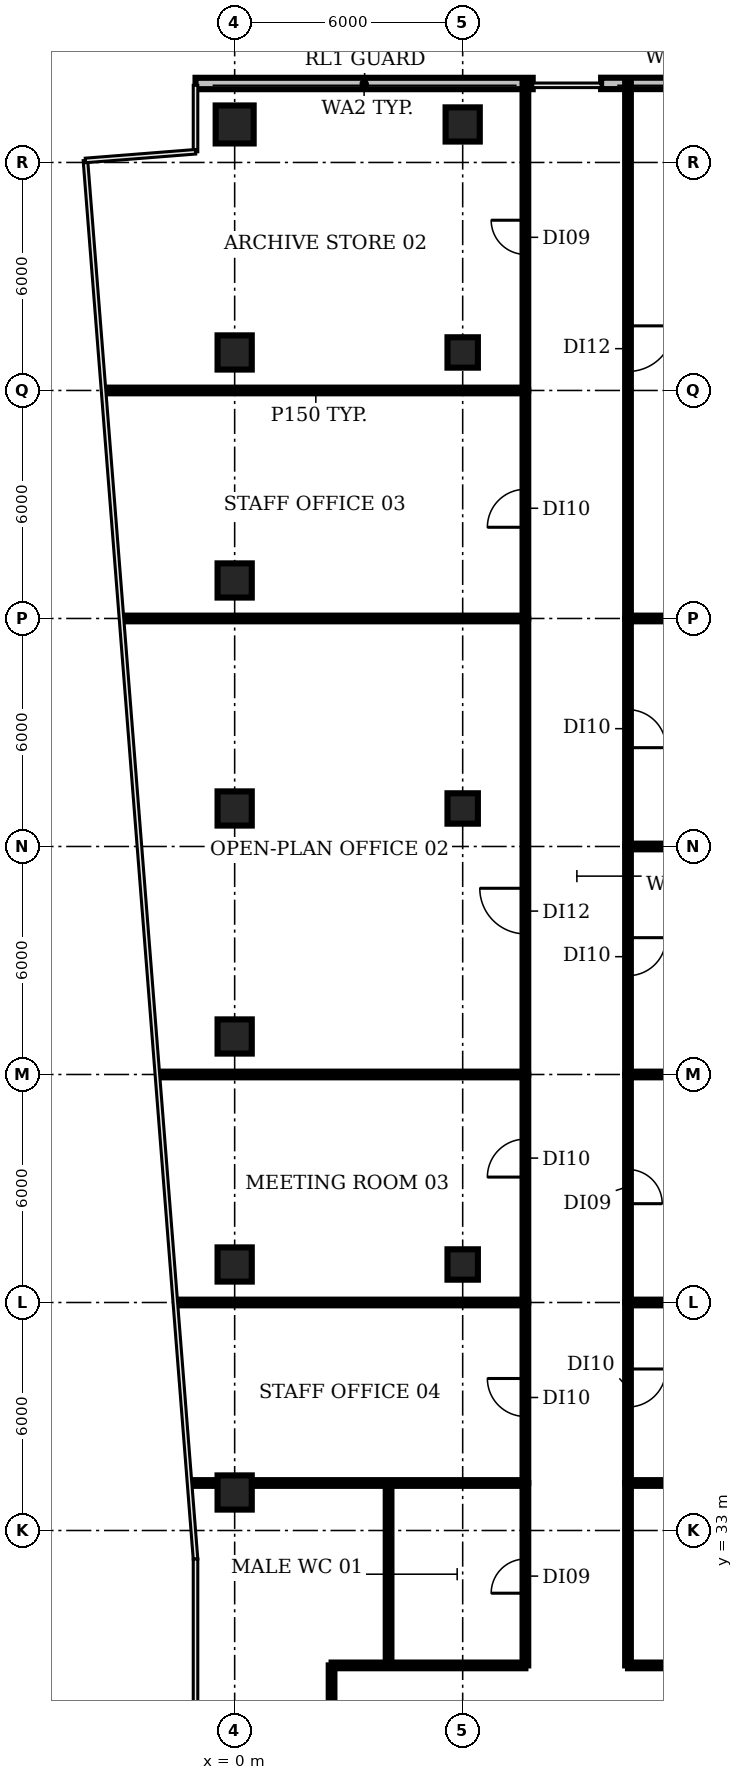
"""IFC4 building model, lengths in metres.
Left out: names, types, materials, properties, quantities, classifications, styles, units other than length and angle.
Written with IfcOpenShell. Run it as: python <this file> out.ifc"""

import sys

from ifc_helpers import new_model, si_unit, direction, frame, frame_2d, origin, origin_2d, place, context, subcontext, project, spatial, rectangle, circle, extrude, element, fill, save


model = new_model("IFC4")
c1 = context("Model", 3, precision=1e-05, world=origin(), true_north=direction((0.0, 1.0)))
c2 = subcontext(c1, "Body", "Model", "MODEL_VIEW")
j1 = project(units=[si_unit("LENGTHUNIT", "METRE"), si_unit("PLANEANGLEUNIT", "RADIAN")], contexts=[c1])
p1 = place(None, origin())
s1 = spatial("IfcSite", under=j1, at=p1, CompositionType="ELEMENT")
p2 = place(p1, origin())
s2 = spatial("IfcBuilding", under=s1, at=p2, CompositionType="ELEMENT")
p3 = place(p2, frame((0.0, 0.0, 92.0)))
s3 = spatial("IfcBuildingStorey", under=s2, at=p3, CompositionType="ELEMENT", Elevation=92.0)
for number, where, z_axis, x_axis in (
    (1, (0.0, 34.0, 0.0), (0.0, 0.0, 1.0), (1.0, 0.0, 0.0)),
    (2, (0.0, 40.0, 0.0), (0.0, 0.0, 1.0), (1.0, 0.0, 0.0)),
    (3, (0.0, 46.0, 0.0), (0.0, 0.0, 1.0), (1.0, 0.0, 0.0)),
    (4, (0.0, 52.0, 0.0), (0.0, 0.0, 1.0), (1.0, 0.0, 0.0)),
    (5, (0.0, 58.0, 0.0), (0.0, 0.0, 1.0), (1.0, 0.0, 0.0)),
    (6, (0.0, 64.0, 0.0), (0.0, 0.0, 1.0), (1.0, 0.0, 0.0)),
):
    element("IfcColumn", number, at=place(p3, frame(where, z_axis=z_axis, x_axis=x_axis)), inside=s3, PredefinedType="COLUMN", context=c2, shape_type="SweptSolid", body=[
        extrude(rectangle(XDim=0.9, YDim=0.9, at=origin_2d()), origin(), (0.0, 0.0, 1.0), 3.85),
    ])
p4 = place(p3, frame((0.0, 70.0, 0.0), z_axis=(0.0, 0.0, 1.0), x_axis=(1.0, 0.0, 0.0)))
e7 = element("IfcColumn", 7, at=p4, inside=s3, PredefinedType="COLUMN", context=c2, shape_type="SweptSolid", body=[
    extrude(circle(Radius=0.5, at=origin_2d()), origin(), (0.0, 0.0, 1.0), 3.85),
])
for number, where, z_axis, x_axis in (
    (8, (6.0, 40.0, 0.0), (0.0, 0.0, 1.0), (1.0, 0.0, 0.0)),
    (9, (6.0, 52.0, 0.0), (0.0, 0.0, 1.0), (1.0, 0.0, 0.0)),
    (10, (6.0, 64.0, 0.0), (0.0, 0.0, 1.0), (1.0, 0.0, 0.0)),
):
    element("IfcColumn", number, at=place(p3, frame(where, z_axis=z_axis, x_axis=x_axis)), inside=s3, PredefinedType="COLUMN", context=c2, shape_type="SweptSolid", body=[
        extrude(rectangle(XDim=0.8, YDim=0.8, at=origin_2d()), origin(), (0.0, 0.0, 1.0), 3.85),
    ])
p5 = place(p3, frame((6.0, 70.0, 0.0), z_axis=(0.0, 0.0, 1.0), x_axis=(1.0, 0.0, 0.0)))
e11 = element("IfcColumn", 11, at=p5, inside=s3, PredefinedType="COLUMN", context=c2, shape_type="SweptSolid", body=[
    extrude(rectangle(XDim=0.9, YDim=0.9, at=origin_2d()), origin(), (0.0, 0.0, 1.0), 3.85),
])
p6 = place(p3, frame((14.357, 71.08, 0.0), z_axis=(0.0, 0.0, 1.0), x_axis=(-1.0, 0.0, 0.0)))
e12 = element("IfcWall", 12, at=p6, inside=s3, PredefinedType="SOLIDWALL", context=c2, shape_type="SweptSolid", body=[
    extrude(rectangle(XDim=4.715, YDim=0.3, at=frame_2d((2.357, 0.0))), origin(), (0.0, 0.0, 1.0), 3.85),
])
p7 = place(p3, frame((7.843, 71.078, 0.0), z_axis=(0.0, 0.0, 1.0), x_axis=(-1.0, 0.0, 0.0)))
e13 = element("IfcWall", 13, at=p7, inside=s3, PredefinedType="SOLIDWALL", context=c2, shape_type="SweptSolid", body=[
    extrude(rectangle(XDim=8.873, YDim=0.3, at=frame_2d((4.436, 0.0))), origin(), (0.0, 0.0, 1.0), 3.85),
])
p8 = place(p3, frame((-3.379, 63.0, 0.0), z_axis=(0.0, 0.0, 1.0), x_axis=(1.0, 0.0, 0.0)))
e14 = element("IfcWall", 14, at=p8, inside=s3, PredefinedType="PARTITIONING", context=c2, shape_type="SweptSolid", body=[
    extrude(rectangle(XDim=11.029, YDim=0.15, at=frame_2d((5.514, 0.0))), origin(), (0.0, 0.0, 1.0), 2.83),
])
p9 = place(p3, frame((-2.93, 57.0, 0.0), z_axis=(0.0, 0.0, 1.0), x_axis=(1.0, 0.0, 0.0)))
e15 = element("IfcWall", 15, at=p9, inside=s3, PredefinedType="PARTITIONING", context=c2, shape_type="SweptSolid", body=[
    extrude(rectangle(XDim=10.58, YDim=0.15, at=frame_2d((5.29, 0.0))), origin(), (0.0, 0.0, 1.0), 2.83),
])
p10 = place(p3, frame((-1.98, 45.0, 0.0), z_axis=(0.0, 0.0, 1.0), x_axis=(1.0, 0.0, 0.0)))
e16 = element("IfcWall", 16, at=p10, inside=s3, PredefinedType="PARTITIONING", context=c2, shape_type="SweptSolid", body=[
    extrude(rectangle(XDim=9.63, YDim=0.15, at=frame_2d((4.815, 0.0))), origin(), (0.0, 0.0, 1.0), 2.83),
])
p11 = place(p3, frame((-1.51, 39.0, 0.0), z_axis=(0.0, 0.0, 1.0), x_axis=(1.0, 0.0, 0.0)))
e17 = element("IfcWall", 17, at=p11, inside=s3, PredefinedType="PARTITIONING", context=c2, shape_type="SweptSolid", body=[
    extrude(rectangle(XDim=9.16, YDim=0.15, at=frame_2d((4.58, 0.0))), origin(), (0.0, 0.0, 1.0), 2.83),
])
p12 = place(p3, frame((-1.14, 34.25, 0.0), z_axis=(0.0, 0.0, 1.0), x_axis=(1.0, 0.0, 0.0)))
e18 = element("IfcWall", 18, at=p12, inside=s3, PredefinedType="PARTITIONING", context=c2, shape_type="SweptSolid", body=[
    extrude(rectangle(XDim=8.79, YDim=0.15, at=frame_2d((4.395, 0.0))), origin(), (0.0, 0.0, 1.0), 2.83),
])
p13 = place(p3, frame((2.55, 25.55, 0.0), z_axis=(0.0, 0.0, 1.0), x_axis=(0.0, 1.0, 0.0)))
e19 = element("IfcWall", 19, at=p13, inside=s3, PredefinedType="PARTITIONING", context=c2, shape_type="SweptSolid", body=[
    extrude(rectangle(XDim=3.9, YDim=0.15, at=frame_2d((1.95, 0.0))), origin(), (0.0, 0.0, 1.0), 2.83),
])
p14 = place(p3, frame((2.55, 29.45, 0.0), z_axis=(0.0, 0.0, 1.0), x_axis=(1.0, 0.0, 0.0)))
e20 = element("IfcWall", 20, at=p14, inside=s3, PredefinedType="PARTITIONING", context=c2, shape_type="SweptSolid", body=[
    extrude(rectangle(XDim=5.1, YDim=0.15, at=frame_2d((2.55, 0.0))), origin(), (0.0, 0.0, 1.0), 2.83),
])
p15 = place(p3, frame((4.05, 29.45, 0.0), z_axis=(0.0, 0.0, 1.0), x_axis=(0.0, 1.0, 0.0)))
e21 = element("IfcWall", 21, at=p15, inside=s3, PredefinedType="PARTITIONING", context=c2, shape_type="SweptSolid", body=[
    extrude(rectangle(XDim=4.8, YDim=0.15, at=frame_2d((2.4, 0.0))), origin(), (0.0, 0.0, 1.0), 2.83),
])
p16 = place(p3, frame((7.65, 29.45, 0.0), z_axis=(0.0, 0.0, 1.0), x_axis=(0.0, 1.0, 0.0)))
e22 = element("IfcWall", 22, at=p16, inside=s3, PredefinedType="PARTITIONING", context=c2, shape_type="SweptSolid", body=[
    extrude(rectangle(XDim=4.8, YDim=0.15, at=frame_2d((2.4, 0.0))), origin(), (0.0, 0.0, 1.0), 2.83),
])
p17 = place(p16, frame((1.9, 0.0, 0.0)))
e23 = element("IfcOpeningElement", 23, at=p17, cuts=e22, PredefinedType="OPENING", context=c2, shape_type="SweptSolid", body=[
    extrude(rectangle(XDim=0.9, YDim=2.1, at=frame_2d((0.45, 1.05))), frame((0.0, 0.085, 0.0), z_axis=(0.0, -1.0, 0.0), x_axis=(1.0, 0.0, 0.0)), (0.0, 0.0, 1.0), 0.17),
])
p18 = place(p3, frame((7.65, 34.25, 0.0), z_axis=(0.0, 0.0, 1.0), x_axis=(0.0, 1.0, 0.0)))
e24 = element("IfcWall", 24, at=p18, inside=s3, PredefinedType="PARTITIONING", context=c2, shape_type="SweptSolid", body=[
    extrude(rectangle(XDim=4.75, YDim=0.15, at=frame_2d((2.375, 0.0))), origin(), (0.0, 0.0, 1.0), 2.83),
])
p19 = place(p18, frame((1.75, 0.0, 0.0)))
e25 = element("IfcOpeningElement", 25, at=p19, cuts=e24, PredefinedType="OPENING", context=c2, shape_type="SweptSolid", body=[
    extrude(rectangle(XDim=1.0, YDim=2.1, at=frame_2d((0.5, 1.05))), frame((0.0, 0.085, 0.0), z_axis=(0.0, -1.0, 0.0), x_axis=(1.0, 0.0, 0.0)), (0.0, 0.0, 1.0), 0.17),
])
p20 = place(p3, frame((7.65, 39.0, 0.0), z_axis=(0.0, 0.0, 1.0), x_axis=(0.0, 1.0, 0.0)))
e26 = element("IfcWall", 26, at=p20, inside=s3, PredefinedType="PARTITIONING", context=c2, shape_type="SweptSolid", body=[
    extrude(rectangle(XDim=6.0, YDim=0.15, at=frame_2d((3.0, 0.0))), origin(), (0.0, 0.0, 1.0), 2.83),
])
p21 = place(p20, frame((3.3, 0.0, 0.0)))
e27 = element("IfcOpeningElement", 27, at=p21, cuts=e26, PredefinedType="OPENING", context=c2, shape_type="SweptSolid", body=[
    extrude(rectangle(XDim=1.0, YDim=2.1, at=frame_2d((0.5, 1.05))), frame((0.0, 0.085, 0.0), z_axis=(0.0, -1.0, 0.0), x_axis=(1.0, 0.0, 0.0)), (0.0, 0.0, 1.0), 0.17),
])
p22 = place(p3, frame((7.65, 45.0, 0.0), z_axis=(0.0, 0.0, 1.0), x_axis=(0.0, 1.0, 0.0)))
e28 = element("IfcWall", 28, at=p22, inside=s3, PredefinedType="PARTITIONING", context=c2, shape_type="SweptSolid", body=[
    extrude(rectangle(XDim=12.0, YDim=0.15, at=frame_2d((6.0, 0.0))), origin(), (0.0, 0.0, 1.0), 2.83),
])
p23 = place(p22, frame((3.7, 0.0, 0.0)))
e29 = element("IfcOpeningElement", 29, at=p23, cuts=e28, PredefinedType="OPENING", context=c2, shape_type="SweptSolid", body=[
    extrude(rectangle(XDim=1.2, YDim=2.1, at=frame_2d((0.6, 1.05))), frame((0.0, 0.085, 0.0), z_axis=(0.0, -1.0, 0.0), x_axis=(1.0, 0.0, 0.0)), (0.0, 0.0, 1.0), 0.17),
])
p24 = place(p3, frame((7.65, 57.0, 0.0), z_axis=(0.0, 0.0, 1.0), x_axis=(0.0, 1.0, 0.0)))
e30 = element("IfcWall", 30, at=p24, inside=s3, PredefinedType="PARTITIONING", context=c2, shape_type="SweptSolid", body=[
    extrude(rectangle(XDim=6.0, YDim=0.15, at=frame_2d((3.0, 0.0))), origin(), (0.0, 0.0, 1.0), 2.83),
])
p25 = place(p24, frame((2.4, 0.0, 0.0)))
e31 = element("IfcOpeningElement", 31, at=p25, cuts=e30, PredefinedType="OPENING", context=c2, shape_type="SweptSolid", body=[
    extrude(rectangle(XDim=1.0, YDim=2.1, at=frame_2d((0.5, 1.05))), frame((0.0, 0.085, 0.0), z_axis=(0.0, -1.0, 0.0), x_axis=(1.0, 0.0, 0.0)), (0.0, 0.0, 1.0), 0.17),
])
p26 = place(p3, frame((7.65, 63.0, 0.0), z_axis=(0.0, 0.0, 1.0), x_axis=(0.0, 1.0, 0.0)))
e32 = element("IfcWall", 32, at=p26, inside=s3, PredefinedType="PARTITIONING", context=c2, shape_type="SweptSolid", body=[
    extrude(rectangle(XDim=8.09, YDim=0.15, at=frame_2d((4.045, 0.0))), origin(), (0.0, 0.0, 1.0), 2.83),
])
p27 = place(p26, frame((3.58, 0.0, 0.0)))
e33 = element("IfcOpeningElement", 33, at=p27, cuts=e32, PredefinedType="OPENING", context=c2, shape_type="SweptSolid", body=[
    extrude(rectangle(XDim=0.9, YDim=2.1, at=frame_2d((0.45, 1.05))), frame((0.0, 0.085, 0.0), z_axis=(0.0, -1.0, 0.0), x_axis=(1.0, 0.0, 0.0)), (0.0, 0.0, 1.0), 0.17),
])
p28 = place(p3, frame((10.35, 29.45, 0.0), z_axis=(0.0, 0.0, 1.0), x_axis=(0.0, 1.0, 0.0)))
e34 = element("IfcWall", 34, at=p28, inside=s3, PredefinedType="PARTITIONING", context=c2, shape_type="SweptSolid", body=[
    extrude(rectangle(XDim=4.8, YDim=0.15, at=frame_2d((2.4, 0.0))), origin(), (0.0, 0.0, 1.0), 2.83),
])
p29 = place(p3, frame((10.35, 29.45, 0.0), z_axis=(0.0, 0.0, 1.0), x_axis=(1.0, 0.0, 0.0)))
e35 = element("IfcWall", 35, at=p29, inside=s3, PredefinedType="PARTITIONING", context=c2, shape_type="SweptSolid", body=[
    extrude(rectangle(XDim=4.05, YDim=0.15, at=frame_2d((2.025, 0.0))), origin(), (0.0, 0.0, 1.0), 2.83),
])
p30 = place(p3, frame((10.35, 34.25, 0.0), z_axis=(0.0, 0.0, 1.0), x_axis=(1.0, 0.0, 0.0)))
e36 = element("IfcWall", 36, at=p30, inside=s3, PredefinedType="PARTITIONING", context=c2, shape_type="SweptSolid", body=[
    extrude(rectangle(XDim=14.92, YDim=0.15, at=frame_2d((7.46, 0.0))), origin(), (0.0, 0.0, 1.0), 2.83),
])
p31 = place(p3, frame((10.35, 39.0, 0.0), z_axis=(0.0, 0.0, 1.0), x_axis=(0.0, -1.0, 0.0)))
e37 = element("IfcWall", 37, at=p31, inside=s3, PredefinedType="PARTITIONING", context=c2, shape_type="SweptSolid", body=[
    extrude(rectangle(XDim=4.75, YDim=0.15, at=frame_2d((2.375, 0.0))), origin(), (0.0, 0.0, 1.0), 2.83),
])
p32 = place(p31, frame((1.75, 0.0, 0.0)))
e38 = element("IfcOpeningElement", 38, at=p32, cuts=e37, PredefinedType="OPENING", context=c2, shape_type="SweptSolid", body=[
    extrude(rectangle(XDim=1.0, YDim=2.1, at=frame_2d((0.5, 1.05))), frame((0.0, 0.085, 0.0), z_axis=(0.0, -1.0, 0.0), x_axis=(1.0, 0.0, 0.0)), (0.0, 0.0, 1.0), 0.17),
])
p33 = place(p3, frame((10.35, 39.0, 0.0), z_axis=(0.0, 0.0, 1.0), x_axis=(1.0, 0.0, 0.0)))
e39 = element("IfcWall", 39, at=p33, inside=s3, PredefinedType="PARTITIONING", context=c2, shape_type="SweptSolid", body=[
    extrude(rectangle(XDim=14.63, YDim=0.15, at=frame_2d((7.315, 0.0))), origin(), (0.0, 0.0, 1.0), 2.83),
])
p34 = place(p3, frame((10.35, 45.0, 0.0), z_axis=(0.0, 0.0, 1.0), x_axis=(0.0, -1.0, 0.0)))
e40 = element("IfcWall", 40, at=p34, inside=s3, PredefinedType="PARTITIONING", context=c2, shape_type="SweptSolid", body=[
    extrude(rectangle(XDim=6.0, YDim=0.15, at=frame_2d((3.0, 0.0))), origin(), (0.0, 0.0, 1.0), 2.83),
])
p35 = place(p34, frame((2.5, 0.0, 0.0)))
e41 = element("IfcOpeningElement", 41, at=p35, cuts=e40, PredefinedType="OPENING", context=c2, shape_type="SweptSolid", body=[
    extrude(rectangle(XDim=0.9, YDim=2.1, at=frame_2d((0.45, 1.05))), frame((0.0, 0.085, 0.0), z_axis=(0.0, -1.0, 0.0), x_axis=(1.0, 0.0, 0.0)), (0.0, 0.0, 1.0), 0.17),
])
p36 = place(p3, frame((10.35, 45.0, 0.0), z_axis=(0.0, 0.0, 1.0), x_axis=(1.0, 0.0, 0.0)))
e42 = element("IfcWall", 42, at=p36, inside=s3, PredefinedType="PARTITIONING", context=c2, shape_type="SweptSolid", body=[
    extrude(rectangle(XDim=14.63, YDim=0.15, at=frame_2d((7.315, 0.0))), origin(), (0.0, 0.0, 1.0), 2.83),
])
p37 = place(p3, frame((10.35, 51.0, 0.0), z_axis=(0.0, 0.0, 1.0), x_axis=(0.0, -1.0, 0.0)))
e43 = element("IfcWall", 43, at=p37, inside=s3, PredefinedType="PARTITIONING", context=c2, shape_type="SweptSolid", body=[
    extrude(rectangle(XDim=6.0, YDim=0.15, at=frame_2d((3.0, 0.0))), origin(), (0.0, 0.0, 1.0), 2.83),
])
p38 = place(p37, frame((2.4, 0.0, 0.0)))
e44 = element("IfcOpeningElement", 44, at=p38, cuts=e43, PredefinedType="OPENING", context=c2, shape_type="SweptSolid", body=[
    extrude(rectangle(XDim=1.0, YDim=2.1, at=frame_2d((0.5, 1.05))), frame((0.0, 0.085, 0.0), z_axis=(0.0, -1.0, 0.0), x_axis=(1.0, 0.0, 0.0)), (0.0, 0.0, 1.0), 0.17),
])
p39 = place(p3, frame((10.35, 51.0, 0.0), z_axis=(0.0, 0.0, 1.0), x_axis=(1.0, 0.0, 0.0)))
e45 = element("IfcWall", 45, at=p39, inside=s3, PredefinedType="PARTITIONING", context=c2, shape_type="SweptSolid", body=[
    extrude(rectangle(XDim=14.63, YDim=0.15, at=frame_2d((7.315, 0.0))), origin(), (0.0, 0.0, 1.0), 2.83),
])
p40 = place(p3, frame((10.35, 57.0, 0.0), z_axis=(0.0, 0.0, 1.0), x_axis=(0.0, -1.0, 0.0)))
e46 = element("IfcWall", 46, at=p40, inside=s3, PredefinedType="PARTITIONING", context=c2, shape_type="SweptSolid", body=[
    extrude(rectangle(XDim=6.0, YDim=0.15, at=frame_2d((3.0, 0.0))), origin(), (0.0, 0.0, 1.0), 2.83),
])
p41 = place(p40, frame((2.4, 0.0, 0.0)))
e47 = element("IfcOpeningElement", 47, at=p41, cuts=e46, PredefinedType="OPENING", context=c2, shape_type="SweptSolid", body=[
    extrude(rectangle(XDim=1.0, YDim=2.1, at=frame_2d((0.5, 1.05))), frame((0.0, 0.085, 0.0), z_axis=(0.0, -1.0, 0.0), x_axis=(1.0, 0.0, 0.0)), (0.0, 0.0, 1.0), 0.17),
])
p42 = place(p3, frame((10.35, 57.0, 0.0), z_axis=(0.0, 0.0, 1.0), x_axis=(1.0, 0.0, 0.0)))
e48 = element("IfcWall", 48, at=p42, inside=s3, PredefinedType="PARTITIONING", context=c2, shape_type="SweptSolid", body=[
    extrude(rectangle(XDim=14.63, YDim=0.15, at=frame_2d((7.315, 0.0))), origin(), (0.0, 0.0, 1.0), 2.83),
])
p43 = place(p3, frame((10.35, 71.09, 0.0), z_axis=(0.0, 0.0, 1.0), x_axis=(0.0, -1.0, 0.0)))
e49 = element("IfcWall", 49, at=p43, inside=s3, PredefinedType="PARTITIONING", context=c2, shape_type="SweptSolid", body=[
    extrude(rectangle(XDim=14.09, YDim=0.15, at=frame_2d((7.045, 0.0))), origin(), (0.0, 0.0, 1.0), 2.83),
])
p44 = place(p43, frame((6.39, 0.0, 0.0)))
e50 = element("IfcOpeningElement", 50, at=p44, cuts=e49, PredefinedType="OPENING", context=c2, shape_type="SweptSolid", body=[
    extrude(rectangle(XDim=1.2, YDim=2.1, at=frame_2d((0.6, 1.05))), frame((0.0, 0.085, 0.0), z_axis=(0.0, -1.0, 0.0), x_axis=(1.0, 0.0, 0.0)), (0.0, 0.0, 1.0), 0.17),
])
p45 = place(p17, origin())
e51 = element("IfcDoor", 51, at=p45, inside=s3, OperationType="SINGLE_SWING_LEFT", PredefinedType="DOOR", context=c2, shape_type="SweptSolid", body=[
    extrude(rectangle(XDim=0.9, YDim=2.1, at=frame_2d((0.45, 1.05))), frame((0.0, 0.025, 0.0), z_axis=(0.0, -1.0, 0.0), x_axis=(1.0, 0.0, 0.0)), (0.0, 0.0, 1.0), 0.05),
])
fill(e23, e51)
p46 = place(p19, origin())
e52 = element("IfcDoor", 52, at=p46, inside=s3, OperationType="SINGLE_SWING_RIGHT", PredefinedType="DOOR", context=c2, shape_type="SweptSolid", body=[
    extrude(rectangle(XDim=1.0, YDim=2.1, at=frame_2d((0.5, 1.05))), frame((0.0, 0.025, 0.0), z_axis=(0.0, -1.0, 0.0), x_axis=(1.0, 0.0, 0.0)), (0.0, 0.0, 1.0), 0.05),
])
fill(e25, e52)
p47 = place(p21, origin())
e53 = element("IfcDoor", 53, at=p47, inside=s3, OperationType="SINGLE_SWING_LEFT", PredefinedType="DOOR", context=c2, shape_type="SweptSolid", body=[
    extrude(rectangle(XDim=1.0, YDim=2.1, at=frame_2d((0.5, 1.05))), frame((0.0, 0.025, 0.0), z_axis=(0.0, -1.0, 0.0), x_axis=(1.0, 0.0, 0.0)), (0.0, 0.0, 1.0), 0.05),
])
fill(e27, e53)
p48 = place(p23, origin())
e54 = element("IfcDoor", 54, at=p48, inside=s3, OperationType="SINGLE_SWING_RIGHT", PredefinedType="DOOR", context=c2, shape_type="SweptSolid", body=[
    extrude(rectangle(XDim=1.2, YDim=2.1, at=frame_2d((0.6, 1.05))), frame((0.0, 0.025, 0.0), z_axis=(0.0, -1.0, 0.0), x_axis=(1.0, 0.0, 0.0)), (0.0, 0.0, 1.0), 0.05),
])
fill(e29, e54)
p49 = place(p25, origin())
e55 = element("IfcDoor", 55, at=p49, inside=s3, OperationType="SINGLE_SWING_LEFT", PredefinedType="DOOR", context=c2, shape_type="SweptSolid", body=[
    extrude(rectangle(XDim=1.0, YDim=2.1, at=frame_2d((0.5, 1.05))), frame((0.0, 0.025, 0.0), z_axis=(0.0, -1.0, 0.0), x_axis=(1.0, 0.0, 0.0)), (0.0, 0.0, 1.0), 0.05),
])
fill(e31, e55)
p50 = place(p27, origin())
e56 = element("IfcDoor", 56, at=p50, inside=s3, OperationType="SINGLE_SWING_RIGHT", PredefinedType="DOOR", context=c2, shape_type="SweptSolid", body=[
    extrude(rectangle(XDim=0.9, YDim=2.1, at=frame_2d((0.45, 1.05))), frame((0.0, 0.025, 0.0), z_axis=(0.0, -1.0, 0.0), x_axis=(1.0, 0.0, 0.0)), (0.0, 0.0, 1.0), 0.05),
])
fill(e33, e56)
p51 = place(p32, origin())
e57 = element("IfcDoor", 57, at=p51, inside=s3, OperationType="SINGLE_SWING_LEFT", PredefinedType="DOOR", context=c2, shape_type="SweptSolid", body=[
    extrude(rectangle(XDim=1.0, YDim=2.1, at=frame_2d((0.5, 1.05))), frame((0.0, 0.025, 0.0), z_axis=(0.0, -1.0, 0.0), x_axis=(1.0, 0.0, 0.0)), (0.0, 0.0, 1.0), 0.05),
])
fill(e38, e57)
p52 = place(p35, origin())
e58 = element("IfcDoor", 58, at=p52, inside=s3, OperationType="SINGLE_SWING_RIGHT", PredefinedType="DOOR", context=c2, shape_type="SweptSolid", body=[
    extrude(rectangle(XDim=0.9, YDim=2.1, at=frame_2d((0.45, 1.05))), frame((0.0, 0.025, 0.0), z_axis=(0.0, -1.0, 0.0), x_axis=(1.0, 0.0, 0.0)), (0.0, 0.0, 1.0), 0.05),
])
fill(e41, e58)
p53 = place(p38, origin())
e59 = element("IfcDoor", 59, at=p53, inside=s3, OperationType="SINGLE_SWING_LEFT", PredefinedType="DOOR", context=c2, shape_type="SweptSolid", body=[
    extrude(rectangle(XDim=1.0, YDim=2.1, at=frame_2d((0.5, 1.05))), frame((0.0, 0.025, 0.0), z_axis=(0.0, -1.0, 0.0), x_axis=(1.0, 0.0, 0.0)), (0.0, 0.0, 1.0), 0.05),
])
fill(e44, e59)
p54 = place(p41, origin())
e60 = element("IfcDoor", 60, at=p54, inside=s3, OperationType="SINGLE_SWING_RIGHT", PredefinedType="DOOR", context=c2, shape_type="SweptSolid", body=[
    extrude(rectangle(XDim=1.0, YDim=2.1, at=frame_2d((0.5, 1.05))), frame((0.0, 0.025, 0.0), z_axis=(0.0, -1.0, 0.0), x_axis=(1.0, 0.0, 0.0)), (0.0, 0.0, 1.0), 0.05),
])
fill(e47, e60)
p55 = place(p44, origin())
e61 = element("IfcDoor", 61, at=p55, inside=s3, OperationType="SINGLE_SWING_LEFT", PredefinedType="DOOR", context=c2, shape_type="SweptSolid", body=[
    extrude(rectangle(XDim=1.2, YDim=2.1, at=frame_2d((0.6, 1.05))), frame((0.0, 0.025, 0.0), z_axis=(0.0, -1.0, 0.0), x_axis=(1.0, 0.0, 0.0)), (0.0, 0.0, 1.0), 0.05),
])
fill(e50, e61)
save(model, sys.argv[1])
